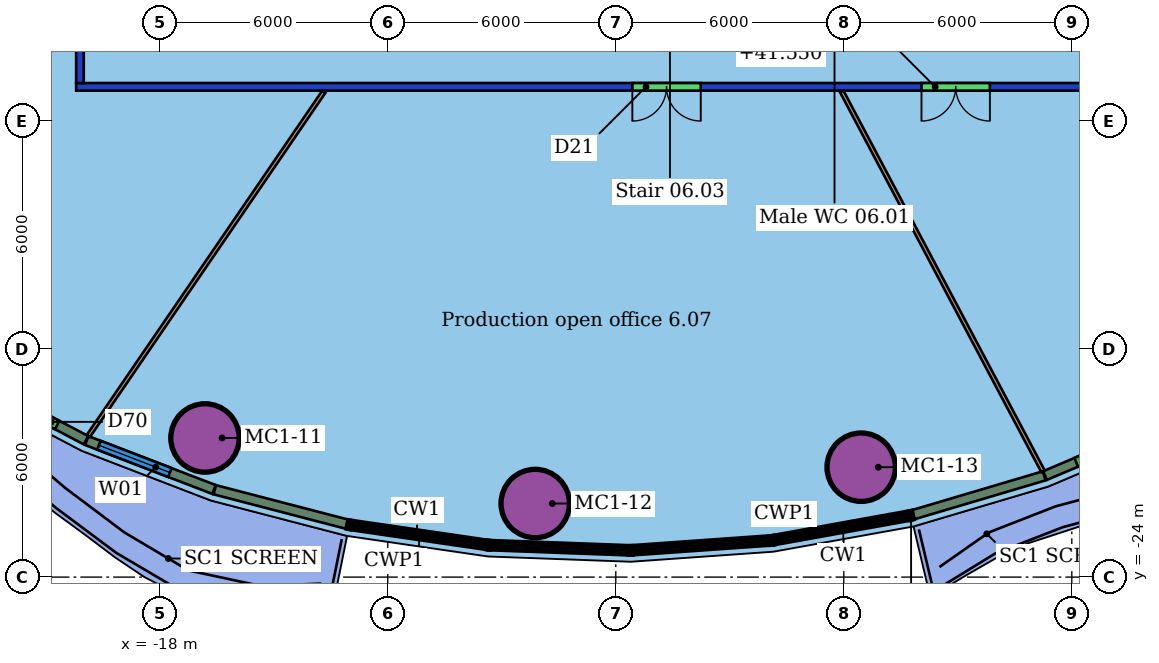
"""IFC4 building model, lengths in metres.
Left out: names, types, materials, properties, quantities, classifications, styles, units other than length and angle.
Written with IfcOpenShell. Run it as: python <this file> out.ifc"""

import sys

from ifc_helpers import new_model, si_unit, direction, frame, frame_2d, origin, origin_2d, place, context, subcontext, project, spatial, rectangle, hollow_circle, extrude, element, fill, save


model = new_model("IFC4")
c1 = context("Model", 3, precision=1e-05, world=origin(), true_north=direction((0.0, 1.0)))
c2 = subcontext(c1, "Body", "Model", "MODEL_VIEW")
j1 = project(units=[si_unit("LENGTHUNIT", "METRE"), si_unit("PLANEANGLEUNIT", "RADIAN")], contexts=[c1])
p1 = place(None, origin())
s1 = spatial("IfcSite", under=j1, at=p1, CompositionType="ELEMENT")
p2 = place(p1, origin())
s2 = spatial("IfcBuilding", under=s1, at=p2, CompositionType="ELEMENT")
p3 = place(p2, frame((0.0, 0.0, 39.7)))
s3 = spatial("IfcBuildingStorey", under=s2, at=p3, CompositionType="ELEMENT", Elevation=39.7)
for number, where, z_axis, x_axis in (
    (1, (-16.81, -20.339, 0.0), (0.0, 0.0, 1.0), (1.0, 0.0, 0.0)),
    (2, (-8.121, -22.064, 0.0), (0.0, 0.0, 1.0), (1.0, 0.0, 0.0)),
    (3, (0.458, -21.108, 0.0), (0.0, 0.0, 1.0), (1.0, 0.0, 0.0)),
):
    element("IfcColumn", number, at=place(p3, frame(where, z_axis=z_axis, x_axis=x_axis)), inside=s3, PredefinedType="COLUMN", context=c2, shape_type="SweptSolid", body=[
        extrude(hollow_circle(Radius=0.9, WallThickness=0.06, at=origin_2d()), origin(), (0.0, 0.0, 1.0), 3.55),
    ])
p4 = place(p3, frame((8.2, -11.1, 0.0), z_axis=(0.0, 0.0, 1.0), x_axis=(-1.0, 0.0, 0.0)))
e4 = element("IfcWall", 4, at=p4, inside=s3, PredefinedType="PARTITIONING", context=c2, shape_type="SweptSolid", body=[
    extrude(rectangle(XDim=28.4, YDim=0.2, at=frame_2d((14.2, 0.0))), origin(), (0.0, 0.0, 1.0), 2.85),
])
p5 = place(p4, frame((11.964, 0.0, 0.0)))
e5 = element("IfcOpeningElement", 5, at=p5, cuts=e4, PredefinedType="OPENING", context=c2, shape_type="SweptSolid", body=[
    extrude(rectangle(XDim=1.8, YDim=2.1, at=frame_2d((0.9, 1.05))), frame((0.0, 0.11, 0.0), z_axis=(0.0, -1.0, 0.0), x_axis=(1.0, 0.0, 0.0)), (0.0, 0.0, 1.0), 0.22),
])
p6 = place(p4, frame((4.356, 0.0, 0.0)))
e6 = element("IfcOpeningElement", 6, at=p6, cuts=e4, PredefinedType="OPENING", context=c2, shape_type="SweptSolid", body=[
    extrude(rectangle(XDim=1.8, YDim=2.1, at=frame_2d((0.9, 1.05))), frame((0.0, 0.11, 0.0), z_axis=(0.0, -1.0, 0.0), x_axis=(1.0, 0.0, 0.0)), (0.0, 0.0, 1.0), 0.22),
])
p7 = place(p3, frame((-20.1, -11.0, 0.0), z_axis=(0.0, 0.0, 1.0), x_axis=(0.0, 1.0, 0.0)))
e7 = element("IfcWall", 7, at=p7, inside=s3, PredefinedType="PARTITIONING", context=c2, shape_type="SweptSolid", body=[
    extrude(rectangle(XDim=22.0, YDim=0.2, at=frame_2d((11.0, 0.0))), origin(), (0.0, 0.0, 1.0), 2.85),
])
p8 = place(p7, frame((13.124, 0.0, 0.0)))
e8 = element("IfcOpeningElement", 8, at=p8, cuts=e7, PredefinedType="OPENING", context=c2, shape_type="SweptSolid", body=[
    extrude(rectangle(XDim=1.1, YDim=2.1, at=frame_2d((0.55, 1.05))), frame((0.0, 0.11, 0.0), z_axis=(0.0, -1.0, 0.0), x_axis=(1.0, 0.0, 0.0)), (0.0, 0.0, 1.0), 0.22),
])
p9 = place(p7, frame((6.013, 0.0, 0.0)))
e9 = element("IfcOpeningElement", 9, at=p9, cuts=e7, PredefinedType="OPENING", context=c2, shape_type="SweptSolid", body=[
    extrude(rectangle(XDim=1.8, YDim=2.1, at=frame_2d((0.9, 1.05))), frame((0.0, 0.11, 0.0), z_axis=(0.0, -1.0, 0.0), x_axis=(1.0, 0.0, 0.0)), (0.0, 0.0, 1.0), 0.22),
])
p10 = place(p3, frame((-19.88, -20.289, 0.0), z_axis=(0.0, 0.0, 1.0), x_axis=(0.564621729177, 0.82534980641, 0.0)))
e10 = element("IfcWall", 10, at=p10, inside=s3, PredefinedType="PARTITIONING", context=c2, shape_type="SweptSolid", body=[
    extrude(rectangle(XDim=10.978, YDim=0.1, at=frame_2d((5.489, 0.0))), origin(), (0.0, 0.0, 1.0), 3.55),
])
p11 = place(p3, frame((5.241, -21.215, 0.0), z_axis=(0.0, 0.0, 1.0), x_axis=(-0.468204132098, 0.883620331752, 0.0)))
e11 = element("IfcWall", 11, at=p11, inside=s3, PredefinedType="PARTITIONING", context=c2, shape_type="SweptSolid", body=[
    extrude(rectangle(XDim=11.308, YDim=0.1, at=frame_2d((5.654, 0.0))), origin(), (0.0, 0.0, 1.0), 3.55),
])
p12 = place(p3, frame((-23.05, -18.763, 0.0), z_axis=(0.0, 0.0, 1.0), x_axis=(0.885034300513, -0.465525817667, 0.0)))
e12 = element("IfcWall", 12, at=p12, inside=s3, PredefinedType="SOLIDWALL", context=c2, shape_type="SweptSolid", body=[
    extrude(rectangle(XDim=3.512, YDim=0.25, at=frame_2d((1.756, 0.0))), origin(), (0.0, 0.0, 1.0), 3.15),
])
p13 = place(p12, frame((0.856, 0.0, 0.0)))
e13 = element("IfcOpeningElement", 13, at=p13, cuts=e12, PredefinedType="OPENING", context=c2, shape_type="SweptSolid", body=[
    extrude(rectangle(XDim=1.8, YDim=2.4, at=frame_2d((0.9, 1.2))), frame((0.0, 0.135, 0.0), z_axis=(0.0, -1.0, 0.0), x_axis=(1.0, 0.0, 0.0)), (0.0, 0.0, 1.0), 0.27),
])
p14 = place(p3, frame((-19.921, -20.407, 0.0), z_axis=(0.0, 0.0, 1.0), x_axis=(0.933305255529, -0.359083973468, 0.0)))
e14 = element("IfcWall", 14, at=p14, inside=s3, PredefinedType="SOLIDWALL", context=c2, shape_type="SweptSolid", body=[
    extrude(rectangle(XDim=3.587, YDim=0.25, at=frame_2d((1.793, 0.0))), origin(), (0.0, 0.0, 1.0), 3.15),
])
p15 = place(p14, frame((0.344, 0.0, 0.8)))
e15 = element("IfcOpeningElement", 15, at=p15, cuts=e14, PredefinedType="OPENING", context=c2, shape_type="SweptSolid", body=[
    extrude(rectangle(XDim=2.0, YDim=2.2, at=frame_2d((1.0, 1.1))), frame((0.0, 0.135, 0.0), z_axis=(0.0, -1.0, 0.0), x_axis=(1.0, 0.0, 0.0)), (0.0, 0.0, 1.0), 0.27),
])
p16 = place(p3, frame((-16.552, -21.702, 0.0), z_axis=(0.0, 0.0, 1.0), x_axis=(0.967782560997, -0.25178743938, 0.0)))
e16 = element("IfcWall", 16, at=p16, inside=s3, PredefinedType="SOLIDWALL", context=c2, shape_type="SweptSolid", body=[
    extrude(rectangle(XDim=3.603, YDim=0.25, at=frame_2d((1.802, 0.0))), origin(), (0.0, 0.0, 1.0), 3.15),
])
p17 = place(p3, frame((1.818, -22.36, 0.0), z_axis=(0.0, 0.0, 1.0), x_axis=(0.958796062101, 0.284095250399, 0.0)))
e17 = element("IfcWall", 17, at=p17, inside=s3, PredefinedType="SOLIDWALL", context=c2, shape_type="SweptSolid", body=[
    extrude(rectangle(XDim=3.603, YDim=0.25, at=frame_2d((1.802, 0.0))), origin(), (0.0, 0.0, 1.0), 3.15),
])
p18 = place(p3, frame((5.294, -21.329, 0.0), z_axis=(0.0, 0.0, 1.0), x_axis=(0.920777409004, 0.390088404169, 0.0)))
e18 = element("IfcWall", 18, at=p18, inside=s3, PredefinedType="SOLIDWALL", context=c2, shape_type="SweptSolid", body=[
    extrude(rectangle(XDim=3.587, YDim=0.25, at=frame_2d((1.794, 0.0))), origin(), (0.0, 0.0, 1.0), 3.15),
])
p19 = place(p18, frame((0.894, 0.0, 0.0)))
e19 = element("IfcOpeningElement", 19, at=p19, cuts=e18, PredefinedType="OPENING", context=c2, shape_type="SweptSolid", body=[
    extrude(rectangle(XDim=1.8, YDim=2.4, at=frame_2d((0.9, 1.2))), frame((0.0, 0.135, 0.0), z_axis=(0.0, -1.0, 0.0), x_axis=(1.0, 0.0, 0.0)), (0.0, 0.0, 1.0), 0.27),
])
p20 = place(p5, origin())
e20 = element("IfcDoor", 20, at=p20, inside=s3, OperationType="DOUBLE_DOOR_SINGLE_SWING", PredefinedType="DOOR", context=c2, shape_type="SweptSolid", body=[
    extrude(rectangle(XDim=1.8, YDim=2.1, at=frame_2d((0.9, 1.05))), frame((0.0, 0.025, 0.0), z_axis=(0.0, -1.0, 0.0), x_axis=(1.0, 0.0, 0.0)), (0.0, 0.0, 1.0), 0.05),
])
fill(e5, e20)
p21 = place(p6, origin())
e21 = element("IfcDoor", 21, at=p21, inside=s3, OperationType="DOUBLE_DOOR_SINGLE_SWING", PredefinedType="DOOR", context=c2, shape_type="SweptSolid", body=[
    extrude(rectangle(XDim=1.8, YDim=2.1, at=frame_2d((0.9, 1.05))), frame((0.0, 0.025, 0.0), z_axis=(0.0, -1.0, 0.0), x_axis=(1.0, 0.0, 0.0)), (0.0, 0.0, 1.0), 0.05),
])
fill(e6, e21)
p22 = place(p13, origin())
e22 = element("IfcDoor", 22, at=p22, inside=s3, OperationType="DOUBLE_DOOR_SLIDING", PredefinedType="DOOR", context=c2, shape_type="SweptSolid", body=[
    extrude(rectangle(XDim=1.8, YDim=2.4, at=frame_2d((0.9, 1.2))), frame((0.0, 0.025, 0.0), z_axis=(0.0, -1.0, 0.0), x_axis=(1.0, 0.0, 0.0)), (0.0, 0.0, 1.0), 0.05),
])
fill(e13, e22)
p23 = place(p15, origin())
e23 = element("IfcWindow", 23, at=p23, inside=s3, PartitioningType="SINGLE_PANEL", PredefinedType="WINDOW", context=c2, shape_type="SweptSolid", body=[
    extrude(rectangle(XDim=2.0, YDim=2.2, at=frame_2d((1.0, 1.1))), frame((0.0, 0.03, 0.0), z_axis=(0.0, -1.0, 0.0), x_axis=(1.0, 0.0, 0.0)), (0.0, 0.0, 1.0), 0.06),
])
fill(e15, e23)
p24 = place(p19, origin())
e24 = element("IfcDoor", 24, at=p24, inside=s3, OperationType="DOUBLE_DOOR_SLIDING", PredefinedType="DOOR", context=c2, shape_type="SweptSolid", body=[
    extrude(rectangle(XDim=1.8, YDim=2.4, at=frame_2d((0.9, 1.2))), frame((0.0, 0.025, 0.0), z_axis=(0.0, -1.0, 0.0), x_axis=(1.0, 0.0, 0.0)), (0.0, 0.0, 1.0), 0.05),
])
fill(e19, e24)
save(model, sys.argv[1])
